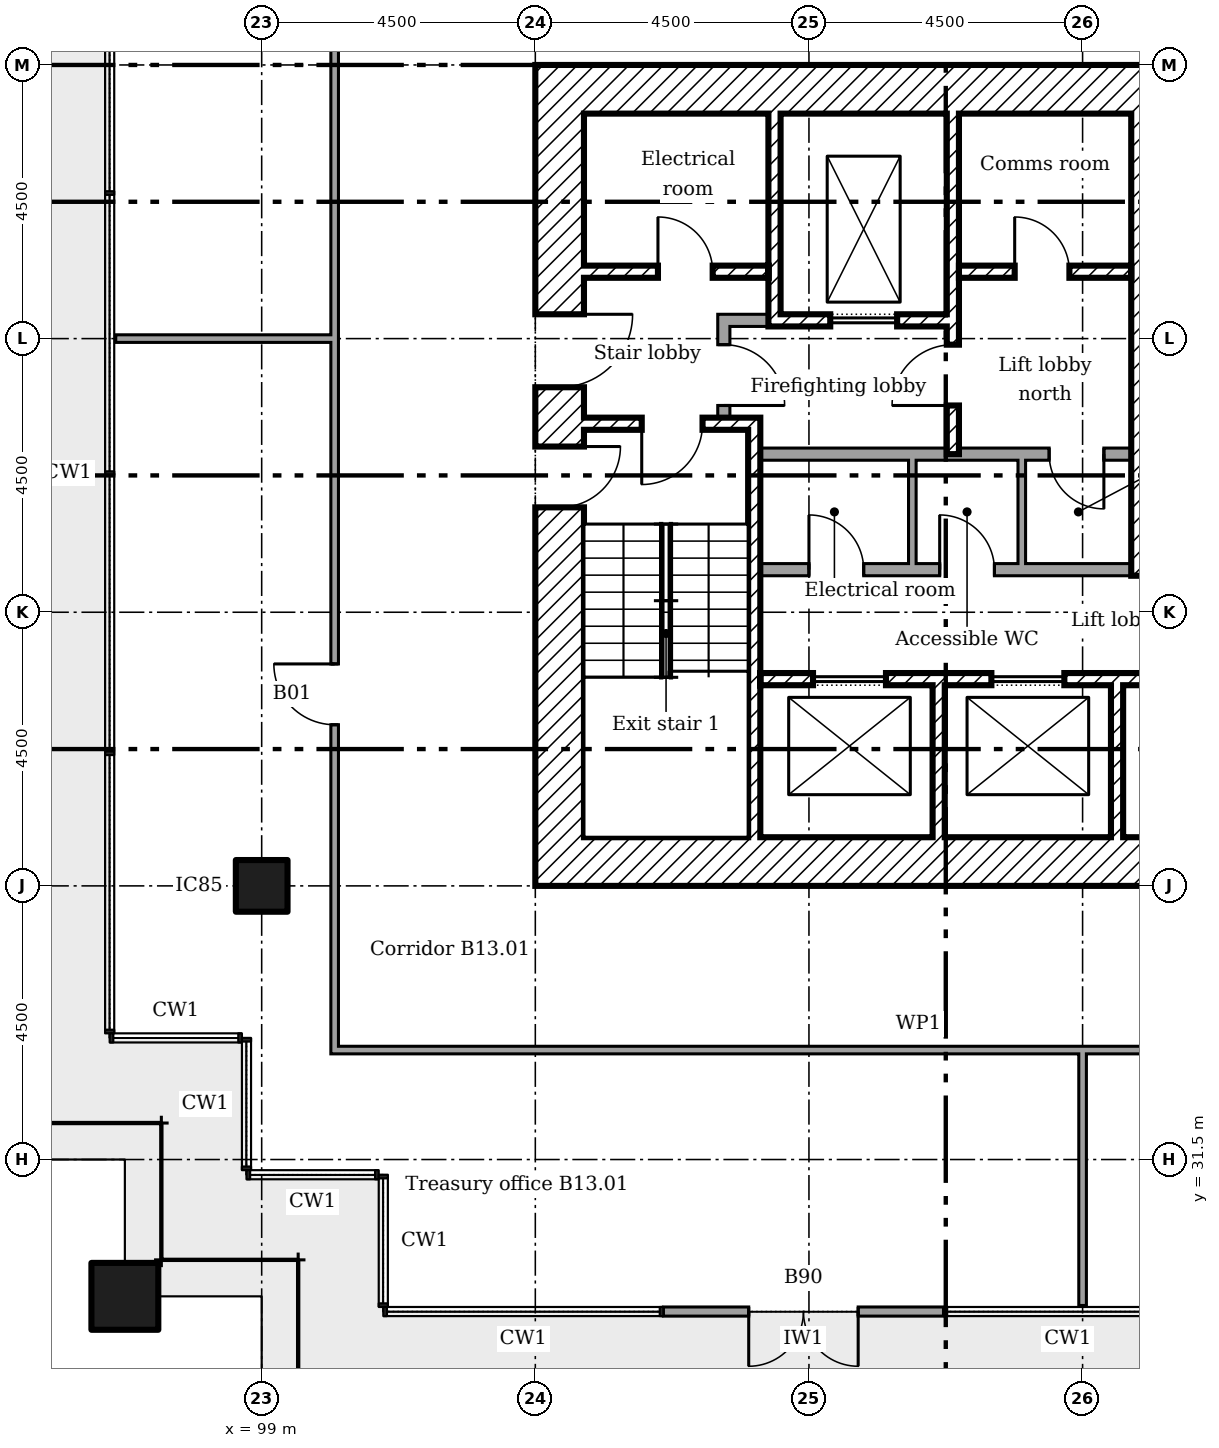
"""IFC4 building model, lengths in metres.
Left out: names, types, materials, properties, quantities, classifications, styles, units other than length and angle.
Written with IfcOpenShell. Run it as: python <this file> out.ifc"""

import sys

from ifc_helpers import new_model, si_unit, direction, frame, frame_2d, origin, origin_2d, place, context, subcontext, project, spatial, rectangle, extrude, element, fill, save


model = new_model("IFC4")
c1 = context("Model", 3, precision=1e-05, world=origin(), true_north=direction((0.0, 1.0)))
c2 = subcontext(c1, "Body", "Model", "MODEL_VIEW")
j1 = project(units=[si_unit("LENGTHUNIT", "METRE"), si_unit("PLANEANGLEUNIT", "RADIAN")], contexts=[c1])
p1 = place(None, origin())
s1 = spatial("IfcSite", under=j1, at=p1, CompositionType="ELEMENT")
p2 = place(p1, origin())
s2 = spatial("IfcBuilding", under=s1, at=p2, CompositionType="ELEMENT")
p3 = place(p2, frame((0.0, 0.0, 58.2)))
s3 = spatial("IfcBuildingStorey", under=s2, at=p3, CompositionType="ELEMENT", Elevation=58.2)
p4 = place(p3, frame((96.75, 29.25, 0.0)))
e1 = element("IfcColumn", 1, at=p4, inside=s3, PredefinedType="COLUMN", context=c2, shape_type="SweptSolid", body=[
    extrude(rectangle(XDim=1.1, YDim=1.1, at=origin_2d()), origin(), (0.0, 0.0, 1.0), 3.6),
])
p5 = place(p3, frame((99.0, 36.0, 0.0)))
e2 = element("IfcColumn", 2, at=p5, inside=s3, PredefinedType="COLUMN", context=c2, shape_type="SweptSolid", body=[
    extrude(rectangle(XDim=0.85, YDim=0.85, at=origin_2d()), origin(), (0.0, 0.0, 1.0), 3.6),
])
p6 = place(p3, frame((105.606, 29.0, 0.0)))
e3 = element("IfcWall", 3, at=p6, inside=s3, PredefinedType="SOLIDWALL", context=c2, shape_type="SweptSolid", body=[
    extrude(rectangle(XDim=4.606, YDim=0.15, at=frame_2d((2.303, 0.0))), origin(), (0.0, 0.0, 1.0), 3.45),
])
p7 = place(p6, frame((1.403, 0.0, 0.0)))
e4 = element("IfcOpeningElement", 4, at=p7, cuts=e3, PredefinedType="OPENING", context=c2, shape_type="SweptSolid", body=[
    extrude(rectangle(XDim=1.8, YDim=2.4, at=frame_2d((0.9, 1.2))), frame((0.0, 0.085, 0.0), z_axis=(0.0, -1.0, 0.0), x_axis=(1.0, 0.0, 0.0)), (0.0, 0.0, 1.0), 0.17),
])
for number, where in (
    (5, (104.3, 49.1, 0.0)),
    (6, (104.3, 36.4, 0.0)),
):
    element("IfcWall", number, at=place(p3, frame(where)), inside=s3, PredefinedType="SHEAR", context=c2, shape_type="SweptSolid", body=[
        extrude(rectangle(XDim=11.9, YDim=0.8, at=frame_2d((5.95, 0.0))), origin(), (0.0, 0.0, 1.0), 3.35),
    ])
p8 = place(p3, frame((103.9, 36.0, 0.0), z_axis=(0.0, 0.0, 1.0), x_axis=(0.0, 1.0, 0.0)))
e7 = element("IfcWall", 7, at=p8, inside=s3, PredefinedType="SHEAR", context=c2, shape_type="SweptSolid", body=[
    extrude(rectangle(XDim=13.5, YDim=0.8, at=frame_2d((6.75, 0.0))), origin(), (0.0, 0.0, 1.0), 3.35),
])
p9 = place(p8, frame((8.2, 0.0, 0.0)))
e8 = element("IfcOpeningElement", 8, at=p9, cuts=e7, PredefinedType="OPENING", context=c2, shape_type="SweptSolid", body=[
    extrude(rectangle(XDim=1.2, YDim=2.1, at=frame_2d((0.6, 1.05))), frame((0.0, 0.41, 0.0), z_axis=(0.0, -1.0, 0.0), x_axis=(1.0, 0.0, 0.0)), (0.0, 0.0, 1.0), 0.82),
])
p10 = place(p8, frame((6.225, 0.0, 0.0)))
e9 = element("IfcOpeningElement", 9, at=p10, cuts=e7, PredefinedType="OPENING", context=c2, shape_type="SweptSolid", body=[
    extrude(rectangle(XDim=1.0, YDim=2.1, at=frame_2d((0.5, 1.05))), frame((0.0, 0.41, 0.0), z_axis=(0.0, -1.0, 0.0), x_axis=(1.0, 0.0, 0.0)), (0.0, 0.0, 1.0), 0.82),
])
p11 = place(p3, frame((107.433, 48.7, 0.0), z_axis=(0.0, 0.0, 1.0), x_axis=(0.0, -1.0, 0.0)))
e10 = element("IfcWall", 10, at=p11, inside=s3, PredefinedType="SHEAR", context=c2, shape_type="SweptSolid", body=[
    extrude(rectangle(XDim=3.5, YDim=0.2, at=frame_2d((1.75, 0.0))), origin(), (0.0, 0.0, 1.0), 3.35),
])
p12 = place(p3, frame((110.367, 48.7, 0.0), z_axis=(0.0, 0.0, 1.0), x_axis=(0.0, -1.0, 0.0)))
e11 = element("IfcWall", 11, at=p12, inside=s3, PredefinedType="SHEAR", context=c2, shape_type="SweptSolid", body=[
    extrude(rectangle(XDim=5.6, YDim=0.2, at=frame_2d((2.8, 0.0))), origin(), (0.0, 0.0, 1.0), 3.35),
])
p13 = place(p12, frame((3.8, 0.0, 0.0)))
e12 = element("IfcOpeningElement", 12, at=p13, cuts=e11, PredefinedType="OPENING", context=c2, shape_type="SweptSolid", body=[
    extrude(rectangle(XDim=1.0, YDim=2.1, at=frame_2d((0.5, 1.05))), frame((0.0, 0.11, 0.0), z_axis=(0.0, -1.0, 0.0), x_axis=(1.0, 0.0, 0.0)), (0.0, 0.0, 1.0), 0.22),
])
for number, where, z_axis, x_axis in (
    (13, (110.133, 36.8, 0.0), (0.0, 0.0, 1.0), (0.0, 1.0, 0.0)),
    (14, (113.067, 36.8, 0.0), (0.0, 0.0, 1.0), (0.0, 1.0, 0.0)),
):
    element("IfcWall", number, at=place(p3, frame(where, z_axis=z_axis, x_axis=x_axis)), inside=s3, PredefinedType="SHEAR", context=c2, shape_type="SweptSolid", body=[
        extrude(rectangle(XDim=2.5, YDim=0.2, at=frame_2d((1.25, 0.0))), origin(), (0.0, 0.0, 1.0), 3.35),
    ])
p14 = place(p3, frame((106.5, 45.3, 0.0)))
e15 = element("IfcWall", 15, at=p14, inside=s3, PredefinedType="PARTITIONING", context=c2, shape_type="SweptSolid", body=[
    extrude(rectangle(XDim=0.833, YDim=0.2, at=frame_2d((0.417, 0.0))), origin(), (0.0, 0.0, 1.0), 3.35),
])
p15 = place(p3, frame((106.6, 43.7, 0.0), z_axis=(0.0, 0.0, 1.0), x_axis=(0.0, 1.0, 0.0)))
e16 = element("IfcWall", 16, at=p15, inside=s3, PredefinedType="PARTITIONING", context=c2, shape_type="SweptSolid", body=[
    extrude(rectangle(XDim=1.5, YDim=0.2, at=frame_2d((0.75, 0.0))), origin(), (0.0, 0.0, 1.0), 3.35),
])
p16 = place(p15, frame((0.2, 0.0, 0.0)))
e17 = element("IfcOpeningElement", 17, at=p16, cuts=e16, PredefinedType="OPENING", context=c2, shape_type="SweptSolid", body=[
    extrude(rectangle(XDim=1.0, YDim=2.1, at=frame_2d((0.5, 1.05))), frame((0.0, 0.11, 0.0), z_axis=(0.0, -1.0, 0.0), x_axis=(1.0, 0.0, 0.0)), (0.0, 0.0, 1.0), 0.22),
])
p17 = place(p3, frame((104.3, 46.1, 0.0)))
e18 = element("IfcWall", 18, at=p17, inside=s3, PredefinedType="SHEAR", context=c2, shape_type="SweptSolid", body=[
    extrude(rectangle(XDim=3.033, YDim=0.2, at=frame_2d((1.517, 0.0))), origin(), (0.0, 0.0, 1.0), 3.35),
])
p18 = place(p17, frame((1.217, 0.0, 0.0)))
e19 = element("IfcOpeningElement", 19, at=p18, cuts=e18, PredefinedType="OPENING", context=c2, shape_type="SweptSolid", body=[
    extrude(rectangle(XDim=0.9, YDim=2.1, at=frame_2d((0.45, 1.05))), frame((0.0, 0.11, 0.0), z_axis=(0.0, -1.0, 0.0), x_axis=(1.0, 0.0, 0.0)), (0.0, 0.0, 1.0), 0.22),
])
p19 = place(p3, frame((110.467, 46.1, 0.0)))
e20 = element("IfcWall", 20, at=p19, inside=s3, PredefinedType="SHEAR", context=c2, shape_type="SweptSolid", body=[
    extrude(rectangle(XDim=2.833, YDim=0.2, at=frame_2d((1.417, 0.0))), origin(), (0.0, 0.0, 1.0), 3.35),
])
p20 = place(p19, frame((0.917, 0.0, 0.0)))
e21 = element("IfcOpeningElement", 21, at=p20, cuts=e20, PredefinedType="OPENING", context=c2, shape_type="SweptSolid", body=[
    extrude(rectangle(XDim=0.9, YDim=2.1, at=frame_2d((0.45, 1.05))), frame((0.0, 0.11, 0.0), z_axis=(0.0, -1.0, 0.0), x_axis=(1.0, 0.0, 0.0)), (0.0, 0.0, 1.0), 0.22),
])
p21 = place(p3, frame((107.533, 45.3, 0.0)))
e22 = element("IfcWall", 22, at=p21, inside=s3, PredefinedType="SHEAR", context=c2, shape_type="SweptSolid", body=[
    extrude(rectangle(XDim=2.733, YDim=0.2, at=frame_2d((1.367, 0.0))), origin(), (0.0, 0.0, 1.0), 3.35),
])
p22 = place(p21, frame((0.817, 0.0, 0.0)))
e23 = element("IfcOpeningElement", 23, at=p22, cuts=e22, PredefinedType="OPENING", context=c2, shape_type="SweptSolid", body=[
    extrude(rectangle(XDim=1.1, YDim=2.1, at=frame_2d((0.55, 1.05))), frame((0.0, 0.11, 0.0), z_axis=(0.0, -1.0, 0.0), x_axis=(1.0, 0.0, 0.0)), (0.0, 0.0, 1.0), 0.22),
])
p23 = place(p3, frame((107.2, 39.4, 0.0)))
e24 = element("IfcWall", 24, at=p23, inside=s3, PredefinedType="SHEAR", context=c2, shape_type="SweptSolid", body=[
    extrude(rectangle(XDim=9.0, YDim=0.2, at=frame_2d((4.5, 0.0))), origin(), (0.0, 0.0, 1.0), 3.35),
])
p24 = place(p23, frame((0.867, 0.0, 0.0)))
e25 = element("IfcOpeningElement", 25, at=p24, cuts=e24, PredefinedType="OPENING", context=c2, shape_type="SweptSolid", body=[
    extrude(rectangle(XDim=1.2, YDim=2.1, at=frame_2d((0.6, 1.05))), frame((0.0, 0.11, 0.0), z_axis=(0.0, -1.0, 0.0), x_axis=(1.0, 0.0, 0.0)), (0.0, 0.0, 1.0), 0.22),
])
p25 = place(p23, frame((3.8, 0.0, 0.0)))
e26 = element("IfcOpeningElement", 26, at=p25, cuts=e24, PredefinedType="OPENING", context=c2, shape_type="SweptSolid", body=[
    extrude(rectangle(XDim=1.2, YDim=2.1, at=frame_2d((0.6, 1.05))), frame((0.0, 0.11, 0.0), z_axis=(0.0, -1.0, 0.0), x_axis=(1.0, 0.0, 0.0)), (0.0, 0.0, 1.0), 0.22),
])
p26 = place(p23, frame((6.733, 0.0, 0.0)))
e27 = element("IfcOpeningElement", 27, at=p26, cuts=e24, PredefinedType="OPENING", context=c2, shape_type="SweptSolid", body=[
    extrude(rectangle(XDim=1.2, YDim=2.1, at=frame_2d((0.6, 1.05))), frame((0.0, 0.11, 0.0), z_axis=(0.0, -1.0, 0.0), x_axis=(1.0, 0.0, 0.0)), (0.0, 0.0, 1.0), 0.22),
])
p27 = place(p3, frame((107.1, 36.8, 0.0), z_axis=(0.0, 0.0, 1.0), x_axis=(0.0, 1.0, 0.0)))
e28 = element("IfcWall", 28, at=p27, inside=s3, PredefinedType="SHEAR", context=c2, shape_type="SweptSolid", body=[
    extrude(rectangle(XDim=6.9, YDim=0.2, at=frame_2d((3.45, 0.0))), origin(), (0.0, 0.0, 1.0), 3.35),
])
p28 = place(p3, frame((104.3, 43.6, 0.0)))
e29 = element("IfcWall", 29, at=p28, inside=s3, PredefinedType="SHEAR", context=c2, shape_type="SweptSolid", body=[
    extrude(rectangle(XDim=2.7, YDim=0.2, at=frame_2d((1.35, 0.0))), origin(), (0.0, 0.0, 1.0), 3.35),
])
p29 = place(p28, frame((0.95, 0.0, 0.0)))
e30 = element("IfcOpeningElement", 30, at=p29, cuts=e29, PredefinedType="OPENING", context=c2, shape_type="SweptSolid", body=[
    extrude(rectangle(XDim=1.0, YDim=2.1, at=frame_2d((0.5, 1.05))), frame((0.0, 0.11, 0.0), z_axis=(0.0, -1.0, 0.0), x_axis=(1.0, 0.0, 0.0)), (0.0, 0.0, 1.0), 0.22),
])
p30 = place(p3, frame((113.4, 41.1, 0.0), z_axis=(0.0, 0.0, 1.0), x_axis=(0.0, 1.0, 0.0)))
e31 = element("IfcWall", 31, at=p30, inside=s3, PredefinedType="SHEAR", context=c2, shape_type="SweptSolid", body=[
    extrude(rectangle(XDim=7.6, YDim=0.2, at=frame_2d((3.8, 0.0))), origin(), (0.0, 0.0, 1.0), 3.35),
])
p31 = place(p3, frame((107.2, 43.1, 0.0)))
e32 = element("IfcWall", 32, at=p31, inside=s3, PredefinedType="PARTITIONING", context=c2, shape_type="SweptSolid", body=[
    extrude(rectangle(XDim=6.1, YDim=0.2, at=frame_2d((3.05, 0.0))), origin(), (0.0, 0.0, 1.0), 3.35),
])
p32 = place(p31, frame((4.75, 0.0, 0.0)))
e33 = element("IfcOpeningElement", 33, at=p32, cuts=e32, PredefinedType="OPENING", context=c2, shape_type="SweptSolid", body=[
    extrude(rectangle(XDim=0.9, YDim=2.1, at=frame_2d((0.45, 1.05))), frame((0.0, 0.11, 0.0), z_axis=(0.0, -1.0, 0.0), x_axis=(1.0, 0.0, 0.0)), (0.0, 0.0, 1.0), 0.22),
])
p33 = place(p3, frame((107.2, 41.2, 0.0)))
e34 = element("IfcWall", 34, at=p33, inside=s3, PredefinedType="PARTITIONING", context=c2, shape_type="SweptSolid", body=[
    extrude(rectangle(XDim=6.1, YDim=0.2, at=frame_2d((3.05, 0.0))), origin(), (0.0, 0.0, 1.0), 3.35),
])
p34 = place(p33, frame((0.8, 0.0, 0.0)))
e35 = element("IfcOpeningElement", 35, at=p34, cuts=e34, PredefinedType="OPENING", context=c2, shape_type="SweptSolid", body=[
    extrude(rectangle(XDim=0.9, YDim=2.1, at=frame_2d((0.45, 1.05))), frame((0.0, 0.11, 0.0), z_axis=(0.0, -1.0, 0.0), x_axis=(1.0, 0.0, 0.0)), (0.0, 0.0, 1.0), 0.22),
])
p35 = place(p33, frame((2.95, 0.0, 0.0)))
e36 = element("IfcOpeningElement", 36, at=p35, cuts=e34, PredefinedType="OPENING", context=c2, shape_type="SweptSolid", body=[
    extrude(rectangle(XDim=0.9, YDim=2.1, at=frame_2d((0.45, 1.05))), frame((0.0, 0.11, 0.0), z_axis=(0.0, -1.0, 0.0), x_axis=(1.0, 0.0, 0.0)), (0.0, 0.0, 1.0), 0.22),
])
for number, where, z_axis, x_axis in (
    (37, (109.7, 41.3, 0.0), (0.0, 0.0, 1.0), (0.0, 1.0, 0.0)),
    (38, (111.5, 41.3, 0.0), (0.0, 0.0, 1.0), (0.0, 1.0, 0.0)),
):
    element("IfcWall", number, at=place(p3, frame(where, z_axis=z_axis, x_axis=x_axis)), inside=s3, PredefinedType="PARTITIONING", context=c2, shape_type="SweptSolid", body=[
        extrude(rectangle(XDim=1.7, YDim=0.125, at=frame_2d((0.85, 0.0))), origin(), (0.0, 0.0, 1.0), 3.35),
    ])
p36 = place(p3, frame((100.137, 33.3, 0.0)))
e39 = element("IfcWall", 39, at=p36, inside=s3, PredefinedType="PARTITIONING", context=c2, shape_type="SweptSolid", body=[
    extrude(rectangle(XDim=19.325, YDim=0.125, at=frame_2d((9.663, 0.0))), origin(), (0.0, 0.0, 1.0), 3.45),
])
p37 = place(p3, frame((96.6, 45.0, 0.0)))
e40 = element("IfcWall", 40, at=p37, inside=s3, PredefinedType="PARTITIONING", context=c2, shape_type="SweptSolid", body=[
    extrude(rectangle(XDim=3.6, YDim=0.125, at=frame_2d((1.8, 0.0))), origin(), (0.0, 0.0, 1.0), 2.851),
])
p38 = place(p3, frame((100.2, 33.363, 0.0), z_axis=(0.0, 0.0, 1.0), x_axis=(0.0, 1.0, 0.0)))
e41 = element("IfcWall", 41, at=p38, inside=s3, PredefinedType="PARTITIONING", context=c2, shape_type="SweptSolid", body=[
    extrude(rectangle(XDim=17.875, YDim=0.125, at=frame_2d((8.938, 0.0))), origin(), (0.0, 0.0, 1.0), 3.45),
])
p39 = place(p38, frame((5.288, 0.0, 0.0)))
e42 = element("IfcOpeningElement", 42, at=p39, cuts=e41, PredefinedType="OPENING", context=c2, shape_type="SweptSolid", body=[
    extrude(rectangle(XDim=1.0, YDim=2.1, at=frame_2d((0.5, 1.05))), frame((0.0, 0.073, 0.0), z_axis=(0.0, -1.0, 0.0), x_axis=(1.0, 0.0, 0.0)), (0.0, 0.0, 1.0), 0.145),
])
p40 = place(p3, frame((112.5, 29.1, 0.0), z_axis=(0.0, 0.0, 1.0), x_axis=(0.0, 1.0, 0.0)))
e43 = element("IfcWall", 43, at=p40, inside=s3, PredefinedType="PARTITIONING", context=c2, shape_type="SweptSolid", body=[
    extrude(rectangle(XDim=4.2, YDim=0.125, at=frame_2d((2.1, 0.0))), origin(), (0.0, 0.0, 1.0), 2.851),
])
p41 = place(p7, frame((1.8, 0.0, 0.0), x_axis=(-1.0, 0.0, 0.0)))
e44 = element("IfcDoor", 44, at=p41, inside=s3, OperationType="DOUBLE_DOOR_DOUBLE_SWING", PredefinedType="NOTDEFINED", context=c2, shape_type="SweptSolid", body=[
    extrude(rectangle(XDim=1.8, YDim=2.4, at=frame_2d((0.9, 1.2))), frame((0.0, 0.025, 0.0), z_axis=(0.0, -1.0, 0.0), x_axis=(1.0, 0.0, 0.0)), (0.0, 0.0, 1.0), 0.05),
])
fill(e4, e44)
p42 = place(p9, frame((1.2, 0.0, 0.0), x_axis=(-1.0, 0.0, 0.0)))
e45 = element("IfcDoor", 45, at=p42, inside=s3, OperationType="SINGLE_SWING_RIGHT", PredefinedType="DOOR", context=c2, shape_type="SweptSolid", body=[
    extrude(rectangle(XDim=1.2, YDim=2.1, at=frame_2d((0.6, 1.05))), frame((0.0, 0.025, 0.0), z_axis=(0.0, -1.0, 0.0), x_axis=(1.0, 0.0, 0.0)), (0.0, 0.0, 1.0), 0.05),
])
fill(e8, e45)
p43 = place(p29, frame((1.0, 0.0, 0.0), x_axis=(-1.0, 0.0, 0.0)))
e46 = element("IfcDoor", 46, at=p43, inside=s3, OperationType="SINGLE_SWING_LEFT", PredefinedType="DOOR", context=c2, shape_type="SweptSolid", body=[
    extrude(rectangle(XDim=1.0, YDim=2.1, at=frame_2d((0.5, 1.05))), frame((0.0, 0.025, 0.0), z_axis=(0.0, -1.0, 0.0), x_axis=(1.0, 0.0, 0.0)), (0.0, 0.0, 1.0), 0.05),
])
fill(e30, e46)
p44 = place(p10, frame((1.0, 0.0, 0.0), x_axis=(-1.0, 0.0, 0.0)))
e47 = element("IfcDoor", 47, at=p44, inside=s3, OperationType="SINGLE_SWING_RIGHT", PredefinedType="DOOR", context=c2, shape_type="SweptSolid", body=[
    extrude(rectangle(XDim=1.0, YDim=2.1, at=frame_2d((0.5, 1.05))), frame((0.0, 0.025, 0.0), z_axis=(0.0, -1.0, 0.0), x_axis=(1.0, 0.0, 0.0)), (0.0, 0.0, 1.0), 0.05),
])
fill(e9, e47)
p45 = place(p13, frame((1.0, 0.0, 0.0), x_axis=(-1.0, 0.0, 0.0)))
e48 = element("IfcDoor", 48, at=p45, inside=s3, OperationType="SINGLE_SWING_RIGHT", PredefinedType="DOOR", context=c2, shape_type="SweptSolid", body=[
    extrude(rectangle(XDim=1.0, YDim=2.1, at=frame_2d((0.5, 1.05))), frame((0.0, 0.025, 0.0), z_axis=(0.0, -1.0, 0.0), x_axis=(1.0, 0.0, 0.0)), (0.0, 0.0, 1.0), 0.05),
])
fill(e12, e48)
p46 = place(p16, frame((1.0, 0.0, 0.0), x_axis=(-1.0, 0.0, 0.0)))
e49 = element("IfcDoor", 49, at=p46, inside=s3, OperationType="SINGLE_SWING_LEFT", PredefinedType="DOOR", context=c2, shape_type="SweptSolid", body=[
    extrude(rectangle(XDim=1.0, YDim=2.1, at=frame_2d((0.5, 1.05))), frame((0.0, 0.025, 0.0), z_axis=(0.0, -1.0, 0.0), x_axis=(1.0, 0.0, 0.0)), (0.0, 0.0, 1.0), 0.05),
])
fill(e17, e49)
p47 = place(p18, origin())
e50 = element("IfcDoor", 50, at=p47, inside=s3, OperationType="SINGLE_SWING_RIGHT", PredefinedType="DOOR", context=c2, shape_type="SweptSolid", body=[
    extrude(rectangle(XDim=0.9, YDim=2.1, at=frame_2d((0.45, 1.05))), frame((0.0, 0.025, 0.0), z_axis=(0.0, -1.0, 0.0), x_axis=(1.0, 0.0, 0.0)), (0.0, 0.0, 1.0), 0.05),
])
fill(e19, e50)
p48 = place(p20, origin())
e51 = element("IfcDoor", 51, at=p48, inside=s3, OperationType="SINGLE_SWING_RIGHT", PredefinedType="DOOR", context=c2, shape_type="SweptSolid", body=[
    extrude(rectangle(XDim=0.9, YDim=2.1, at=frame_2d((0.45, 1.05))), frame((0.0, 0.025, 0.0), z_axis=(0.0, -1.0, 0.0), x_axis=(1.0, 0.0, 0.0)), (0.0, 0.0, 1.0), 0.05),
])
fill(e21, e51)
p49 = place(p34, origin())
e52 = element("IfcDoor", 52, at=p49, inside=s3, OperationType="SINGLE_SWING_RIGHT", PredefinedType="DOOR", context=c2, shape_type="SweptSolid", body=[
    extrude(rectangle(XDim=0.9, YDim=2.1, at=frame_2d((0.45, 1.05))), frame((0.0, 0.025, 0.0), z_axis=(0.0, -1.0, 0.0), x_axis=(1.0, 0.0, 0.0)), (0.0, 0.0, 1.0), 0.05),
])
fill(e35, e52)
p50 = place(p35, origin())
e53 = element("IfcDoor", 53, at=p50, inside=s3, OperationType="SINGLE_SWING_RIGHT", PredefinedType="DOOR", context=c2, shape_type="SweptSolid", body=[
    extrude(rectangle(XDim=0.9, YDim=2.1, at=frame_2d((0.45, 1.05))), frame((0.0, 0.025, 0.0), z_axis=(0.0, -1.0, 0.0), x_axis=(1.0, 0.0, 0.0)), (0.0, 0.0, 1.0), 0.05),
])
fill(e36, e53)
p51 = place(p32, frame((0.9, 0.0, 0.0), x_axis=(-1.0, 0.0, 0.0)))
e54 = element("IfcDoor", 54, at=p51, inside=s3, OperationType="SINGLE_SWING_RIGHT", PredefinedType="DOOR", context=c2, shape_type="SweptSolid", body=[
    extrude(rectangle(XDim=0.9, YDim=2.1, at=frame_2d((0.45, 1.05))), frame((0.0, 0.025, 0.0), z_axis=(0.0, -1.0, 0.0), x_axis=(1.0, 0.0, 0.0)), (0.0, 0.0, 1.0), 0.05),
])
fill(e33, e54)
p52 = place(p22, origin())
e55 = element("IfcDoor", 55, at=p52, inside=s3, OperationType="SLIDING_TO_LEFT", PredefinedType="DOOR", context=c2, shape_type="SweptSolid", body=[
    extrude(rectangle(XDim=1.1, YDim=2.1, at=frame_2d((0.55, 1.05))), frame((0.0, 0.025, 0.0), z_axis=(0.0, -1.0, 0.0), x_axis=(1.0, 0.0, 0.0)), (0.0, 0.0, 1.0), 0.05),
])
fill(e23, e55)
p53 = place(p24, origin())
e56 = element("IfcDoor", 56, at=p53, inside=s3, OperationType="SLIDING_TO_LEFT", PredefinedType="DOOR", context=c2, shape_type="SweptSolid", body=[
    extrude(rectangle(XDim=1.2, YDim=2.1, at=frame_2d((0.6, 1.05))), frame((0.0, 0.025, 0.0), z_axis=(0.0, -1.0, 0.0), x_axis=(1.0, 0.0, 0.0)), (0.0, 0.0, 1.0), 0.05),
])
fill(e25, e56)
p54 = place(p25, origin())
e57 = element("IfcDoor", 57, at=p54, inside=s3, OperationType="SLIDING_TO_LEFT", PredefinedType="DOOR", context=c2, shape_type="SweptSolid", body=[
    extrude(rectangle(XDim=1.2, YDim=2.1, at=frame_2d((0.6, 1.05))), frame((0.0, 0.025, 0.0), z_axis=(0.0, -1.0, 0.0), x_axis=(1.0, 0.0, 0.0)), (0.0, 0.0, 1.0), 0.05),
])
fill(e26, e57)
p55 = place(p39, origin())
e58 = element("IfcDoor", 58, at=p55, inside=s3, OperationType="SINGLE_SWING_LEFT", PredefinedType="DOOR", context=c2, shape_type="SweptSolid", body=[
    extrude(rectangle(XDim=1.0, YDim=2.1, at=frame_2d((0.5, 1.05))), frame((0.0, 0.025, 0.0), z_axis=(0.0, -1.0, 0.0), x_axis=(1.0, 0.0, 0.0)), (0.0, 0.0, 1.0), 0.05),
])
fill(e42, e58)
save(model, sys.argv[1])
